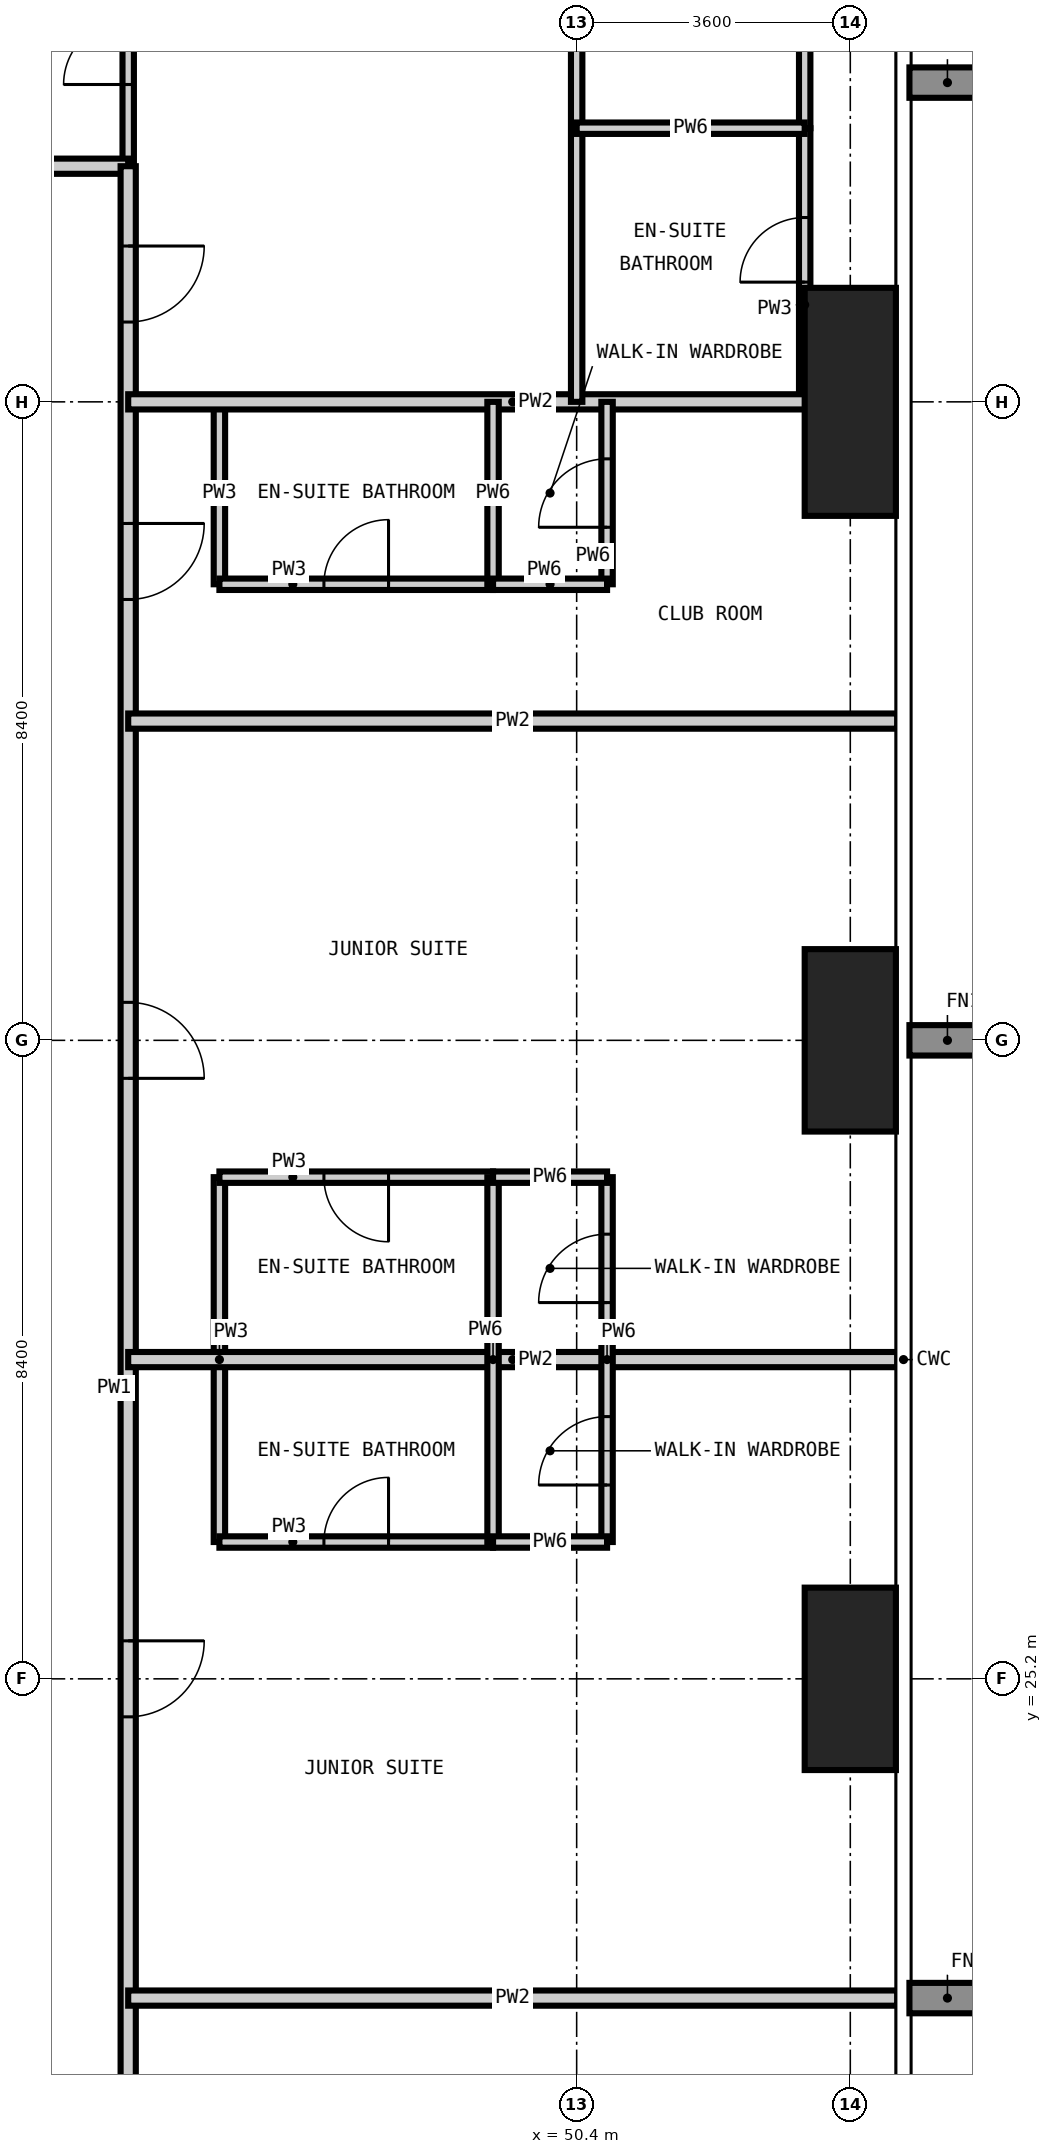
"""IFC4 building model, lengths in metres.
Left out: names, types, materials, properties, quantities, classifications, styles, units other than length and angle.
Written with IfcOpenShell. Run it as: python <this file> out.ifc"""

import sys

from ifc_helpers import new_model, si_unit, direction, frame, frame_2d, origin, origin_2d, place, context, subcontext, project, spatial, rectangle, extrude, element, fill, save


model = new_model("IFC4")
c1 = context("Model", 3, precision=1e-05, world=origin(), true_north=direction((0.0, 1.0)))
c2 = subcontext(c1, "Body", "Model", "MODEL_VIEW")
j1 = project(units=[si_unit("LENGTHUNIT", "METRE"), si_unit("PLANEANGLEUNIT", "RADIAN")], contexts=[c1])
p1 = place(None, origin())
s1 = spatial("IfcSite", under=j1, at=p1, CompositionType="ELEMENT")
p2 = place(p1, origin())
s2 = spatial("IfcBuilding", under=s1, at=p2, CompositionType="ELEMENT")
p3 = place(p2, frame((0.0, 0.0, 216.6)))
s3 = spatial("IfcBuildingStorey", under=s2, at=p3, CompositionType="ELEMENT", Elevation=216.6)
for number, where, z_axis, x_axis in (
    (1, (54.0, 25.2, -0.35), (0.0, 0.0, 1.0), (1.0, 0.0, 0.0)),
    (2, (54.0, 33.6, -0.35), (0.0, 0.0, 1.0), (1.0, 0.0, 0.0)),
):
    element("IfcColumn", number, at=place(p3, frame(where, z_axis=z_axis, x_axis=x_axis)), inside=s3, PredefinedType="COLUMN", context=c2, shape_type="SweptSolid", body=[
        extrude(rectangle(XDim=1.2, YDim=2.4, at=origin_2d()), origin(), (0.0, 0.0, 1.0), 3.55),
    ])
p4 = place(p3, frame((54.0, 42.0, -0.35), z_axis=(0.0, 0.0, 1.0), x_axis=(1.0, 0.0, 0.0)))
e3 = element("IfcColumn", 3, at=p4, inside=s3, PredefinedType="COLUMN", context=c2, shape_type="SweptSolid", body=[
    extrude(rectangle(XDim=1.2, YDim=3.0, at=origin_2d()), origin(), (0.0, 0.0, 1.0), 3.55),
])
p5 = place(p3, frame((44.5, 45.1, 0.0), z_axis=(0.0, 0.0, 1.0), x_axis=(0.0, 1.0, 0.0)))
e4 = element("IfcWall", 4, at=p5, inside=s3, PredefinedType="PARTITIONING", context=c2, shape_type="SweptSolid", body=[
    extrude(rectangle(XDim=3.0, YDim=0.15, at=frame_2d((1.5, 0.0))), origin(), (0.0, 0.0, 1.0), 3.2),
])
p6 = place(p5, frame((1.075, 0.0, 0.0)))
e5 = element("IfcOpeningElement", 5, at=p6, cuts=e4, PredefinedType="OPENING", context=c2, shape_type="SweptSolid", body=[
    extrude(rectangle(XDim=0.85, YDim=2.1, at=frame_2d((0.425, 1.05))), frame((0.0, 0.085, 0.0), z_axis=(0.0, -1.0, 0.0), x_axis=(1.0, 0.0, 0.0)), (0.0, 0.0, 1.0), 0.17),
])
p7 = place(p3, frame((45.7, 27.0, 0.0), z_axis=(0.0, 0.0, 1.0), x_axis=(0.0, 1.0, 0.0)))
e6 = element("IfcWall", 6, at=p7, inside=s3, PredefinedType="PARTITIONING", context=c2, shape_type="SweptSolid", body=[
    extrude(rectangle(XDim=4.8, YDim=0.15, at=frame_2d((2.4, 0.0))), origin(), (0.0, 0.0, 1.0), 3.2),
])
p8 = place(p3, frame((45.7, 39.6, 0.0), z_axis=(0.0, 0.0, 1.0), x_axis=(0.0, 1.0, 0.0)))
e7 = element("IfcWall", 7, at=p8, inside=s3, PredefinedType="PARTITIONING", context=c2, shape_type="SweptSolid", body=[
    extrude(rectangle(XDim=2.4, YDim=0.15, at=frame_2d((1.2, 0.0))), origin(), (0.0, 0.0, 1.0), 3.2),
])
p9 = place(p3, frame((53.4, 42.0, 0.0), z_axis=(0.0, 0.0, 1.0), x_axis=(0.0, 1.0, 0.0)))
e8 = element("IfcWall", 8, at=p9, inside=s3, PredefinedType="PARTITIONING", context=c2, shape_type="SweptSolid", body=[
    extrude(rectangle(XDim=3.6, YDim=0.15, at=frame_2d((1.8, 0.0))), origin(), (0.0, 0.0, 1.0), 3.2),
])
p10 = place(p9, frame((1.575, 0.0, 0.0)))
e9 = element("IfcOpeningElement", 9, at=p10, cuts=e8, PredefinedType="OPENING", context=c2, shape_type="SweptSolid", body=[
    extrude(rectangle(XDim=0.85, YDim=2.1, at=frame_2d((0.425, 1.05))), frame((0.0, 0.085, 0.0), z_axis=(0.0, -1.0, 0.0), x_axis=(1.0, 0.0, 0.0)), (0.0, 0.0, 1.0), 0.17),
])
p11 = place(p3, frame((45.7, 27.0, 0.0), z_axis=(0.0, 0.0, 1.0), x_axis=(1.0, 0.0, 0.0)))
e10 = element("IfcWall", 10, at=p11, inside=s3, PredefinedType="PARTITIONING", context=c2, shape_type="SweptSolid", body=[
    extrude(rectangle(XDim=3.6, YDim=0.15, at=frame_2d((1.8, 0.0))), origin(), (0.0, 0.0, 1.0), 3.2),
])
p12 = place(p11, frame((1.375, 0.0, 0.0)))
e11 = element("IfcOpeningElement", 11, at=p12, cuts=e10, PredefinedType="OPENING", context=c2, shape_type="SweptSolid", body=[
    extrude(rectangle(XDim=0.85, YDim=2.1, at=frame_2d((0.425, 1.05))), frame((0.0, 0.085, 0.0), z_axis=(0.0, -1.0, 0.0), x_axis=(1.0, 0.0, 0.0)), (0.0, 0.0, 1.0), 0.17),
])
p13 = place(p3, frame((45.7, 31.8, 0.0), z_axis=(0.0, 0.0, 1.0), x_axis=(1.0, 0.0, 0.0)))
e12 = element("IfcWall", 12, at=p13, inside=s3, PredefinedType="PARTITIONING", context=c2, shape_type="SweptSolid", body=[
    extrude(rectangle(XDim=3.6, YDim=0.15, at=frame_2d((1.8, 0.0))), origin(), (0.0, 0.0, 1.0), 3.2),
])
p14 = place(p13, frame((1.375, 0.0, 0.0)))
e13 = element("IfcOpeningElement", 13, at=p14, cuts=e12, PredefinedType="OPENING", context=c2, shape_type="SweptSolid", body=[
    extrude(rectangle(XDim=0.85, YDim=2.1, at=frame_2d((0.425, 1.05))), frame((0.0, 0.085, 0.0), z_axis=(0.0, -1.0, 0.0), x_axis=(1.0, 0.0, 0.0)), (0.0, 0.0, 1.0), 0.17),
])
p15 = place(p3, frame((45.7, 39.6, 0.0), z_axis=(0.0, 0.0, 1.0), x_axis=(1.0, 0.0, 0.0)))
e14 = element("IfcWall", 14, at=p15, inside=s3, PredefinedType="PARTITIONING", context=c2, shape_type="SweptSolid", body=[
    extrude(rectangle(XDim=3.6, YDim=0.15, at=frame_2d((1.8, 0.0))), origin(), (0.0, 0.0, 1.0), 3.2),
])
p16 = place(p15, frame((1.375, 0.0, 0.0)))
e15 = element("IfcOpeningElement", 15, at=p16, cuts=e14, PredefinedType="OPENING", context=c2, shape_type="SweptSolid", body=[
    extrude(rectangle(XDim=0.85, YDim=2.1, at=frame_2d((0.425, 1.05))), frame((0.0, 0.085, 0.0), z_axis=(0.0, -1.0, 0.0), x_axis=(1.0, 0.0, 0.0)), (0.0, 0.0, 1.0), 0.17),
])
p17 = place(p3, frame((42.0, 45.1, 0.0), z_axis=(0.0, 0.0, 1.0), x_axis=(1.0, 0.0, 0.0)))
e16 = element("IfcWall", 16, at=p17, inside=s3, PredefinedType="PARTITIONING", context=c2, shape_type="SweptSolid", body=[
    extrude(rectangle(XDim=2.5, YDim=0.2, at=frame_2d((1.25, 0.0))), origin(), (0.0, 0.0, 1.0), 3.2),
])
p18 = place(p3, frame((44.5, 45.1, 0.0), z_axis=(0.0, 0.0, 1.0), x_axis=(0.0, -1.0, 0.0)))
e17 = element("IfcWall", 17, at=p18, inside=s3, PredefinedType="PARTITIONING", context=c2, shape_type="SweptSolid", body=[
    extrude(rectangle(XDim=32.0, YDim=0.2, at=frame_2d((16.0, 0.0))), origin(), (0.0, 0.0, 1.0), 3.2),
])
p19 = place(p18, frame((25.7, 0.0, 0.0)))
e18 = element("IfcOpeningElement", 18, at=p19, cuts=e17, PredefinedType="OPENING", context=c2, shape_type="SweptSolid", body=[
    extrude(rectangle(XDim=1.0, YDim=2.2, at=frame_2d((0.5, 1.1))), frame((0.0, 0.11, 0.0), z_axis=(0.0, -1.0, 0.0), x_axis=(1.0, 0.0, 0.0)), (0.0, 0.0, 1.0), 0.22),
])
p20 = place(p18, frame((19.4, 0.0, 0.0)))
e19 = element("IfcOpeningElement", 19, at=p20, cuts=e17, PredefinedType="OPENING", context=c2, shape_type="SweptSolid", body=[
    extrude(rectangle(XDim=1.0, YDim=2.2, at=frame_2d((0.5, 1.1))), frame((0.0, 0.11, 0.0), z_axis=(0.0, -1.0, 0.0), x_axis=(1.0, 0.0, 0.0)), (0.0, 0.0, 1.0), 0.22),
])
p21 = place(p18, frame((11.0, 0.0, 0.0)))
e20 = element("IfcOpeningElement", 20, at=p21, cuts=e17, PredefinedType="OPENING", context=c2, shape_type="SweptSolid", body=[
    extrude(rectangle(XDim=1.0, YDim=2.2, at=frame_2d((0.5, 1.1))), frame((0.0, 0.11, 0.0), z_axis=(0.0, -1.0, 0.0), x_axis=(1.0, 0.0, 0.0)), (0.0, 0.0, 1.0), 0.22),
])
p22 = place(p18, frame((4.7, 0.0, 0.0)))
e21 = element("IfcOpeningElement", 21, at=p22, cuts=e17, PredefinedType="OPENING", context=c2, shape_type="SweptSolid", body=[
    extrude(rectangle(XDim=1.0, YDim=2.2, at=frame_2d((0.5, 1.1))), frame((0.0, 0.11, 0.0), z_axis=(0.0, -1.0, 0.0), x_axis=(1.0, 0.0, 0.0)), (0.0, 0.0, 1.0), 0.22),
])
p23 = place(p18, frame((29.65, 0.0, 0.0)))
e22 = element("IfcOpeningElement", 22, at=p23, cuts=e17, PredefinedType="OPENING", context=c2, shape_type="SweptSolid", body=[
    extrude(rectangle(XDim=1.0, YDim=2.2, at=frame_2d((0.5, 1.1))), frame((0.0, 0.11, 0.0), z_axis=(0.0, -1.0, 0.0), x_axis=(1.0, 0.0, 0.0)), (0.0, 0.0, 1.0), 0.22),
])
p24 = place(p18, frame((1.05, 0.0, 0.0)))
e23 = element("IfcOpeningElement", 23, at=p24, cuts=e17, PredefinedType="OPENING", context=c2, shape_type="SweptSolid", body=[
    extrude(rectangle(XDim=1.0, YDim=2.2, at=frame_2d((0.5, 1.1))), frame((0.0, 0.11, 0.0), z_axis=(0.0, -1.0, 0.0), x_axis=(1.0, 0.0, 0.0)), (0.0, 0.0, 1.0), 0.22),
])
for number, where, z_axis, x_axis in (
    (24, (44.5, 21.0, 0.0), (0.0, 0.0, 1.0), (1.0, 0.0, 0.0)),
    (25, (44.5, 29.4, 0.0), (0.0, 0.0, 1.0), (1.0, 0.0, 0.0)),
    (26, (44.5, 37.8, 0.0), (0.0, 0.0, 1.0), (1.0, 0.0, 0.0)),
    (27, (44.5, 42.0, 0.0), (0.0, 0.0, 1.0), (1.0, 0.0, 0.0)),
):
    element("IfcWall", number, at=place(p3, frame(where, z_axis=z_axis, x_axis=x_axis)), inside=s3, PredefinedType="PARTITIONING", context=c2, shape_type="SweptSolid", body=[
        extrude(rectangle(XDim=10.118, YDim=0.2, at=frame_2d((5.059, 0.0))), origin(), (0.0, 0.0, 1.0), 3.2),
    ])
p25 = place(p3, frame((49.3, 27.0, 0.0), z_axis=(0.0, 0.0, 1.0), x_axis=(0.0, 1.0, 0.0)))
e28 = element("IfcWall", 28, at=p25, inside=s3, PredefinedType="PARTITIONING", context=c2, shape_type="SweptSolid", body=[
    extrude(rectangle(XDim=4.8, YDim=0.15, at=frame_2d((2.4, 0.0))), origin(), (0.0, 0.0, 1.0), 3.2),
])
p26 = place(p3, frame((49.3, 39.6, 0.0), z_axis=(0.0, 0.0, 1.0), x_axis=(0.0, 1.0, 0.0)))
e29 = element("IfcWall", 29, at=p26, inside=s3, PredefinedType="PARTITIONING", context=c2, shape_type="SweptSolid", body=[
    extrude(rectangle(XDim=2.4, YDim=0.15, at=frame_2d((1.2, 0.0))), origin(), (0.0, 0.0, 1.0), 3.2),
])
p27 = place(p3, frame((50.4, 42.0, 0.0), z_axis=(0.0, 0.0, 1.0), x_axis=(0.0, 1.0, 0.0)))
e30 = element("IfcWall", 30, at=p27, inside=s3, PredefinedType="PARTITIONING", context=c2, shape_type="SweptSolid", body=[
    extrude(rectangle(XDim=12.618, YDim=0.15, at=frame_2d((6.309, 0.0))), origin(), (0.0, 0.0, 1.0), 3.2),
])
p28 = place(p27, frame((8.85, 0.0, 0.0)))
e31 = element("IfcOpeningElement", 31, at=p28, cuts=e30, PredefinedType="OPENING", context=c2, shape_type="SweptSolid", body=[
    extrude(rectangle(XDim=0.9, YDim=2.1, at=frame_2d((0.45, 1.05))), frame((0.0, 0.085, 0.0), z_axis=(0.0, -1.0, 0.0), x_axis=(1.0, 0.0, 0.0)), (0.0, 0.0, 1.0), 0.17),
])
p29 = place(p3, frame((50.8, 27.0, 0.0), z_axis=(0.0, 0.0, 1.0), x_axis=(0.0, 1.0, 0.0)))
e32 = element("IfcWall", 32, at=p29, inside=s3, PredefinedType="PARTITIONING", context=c2, shape_type="SweptSolid", body=[
    extrude(rectangle(XDim=4.8, YDim=0.15, at=frame_2d((2.4, 0.0))), origin(), (0.0, 0.0, 1.0), 3.2),
])
p30 = place(p29, frame((0.75, 0.0, 0.0)))
e33 = element("IfcOpeningElement", 33, at=p30, cuts=e32, PredefinedType="OPENING", context=c2, shape_type="SweptSolid", body=[
    extrude(rectangle(XDim=0.9, YDim=2.1, at=frame_2d((0.45, 1.05))), frame((0.0, 0.085, 0.0), z_axis=(0.0, -1.0, 0.0), x_axis=(1.0, 0.0, 0.0)), (0.0, 0.0, 1.0), 0.17),
])
p31 = place(p29, frame((3.15, 0.0, 0.0)))
e34 = element("IfcOpeningElement", 34, at=p31, cuts=e32, PredefinedType="OPENING", context=c2, shape_type="SweptSolid", body=[
    extrude(rectangle(XDim=0.9, YDim=2.1, at=frame_2d((0.45, 1.05))), frame((0.0, 0.085, 0.0), z_axis=(0.0, -1.0, 0.0), x_axis=(1.0, 0.0, 0.0)), (0.0, 0.0, 1.0), 0.17),
])
p32 = place(p3, frame((50.8, 39.6, 0.0), z_axis=(0.0, 0.0, 1.0), x_axis=(0.0, 1.0, 0.0)))
e35 = element("IfcWall", 35, at=p32, inside=s3, PredefinedType="PARTITIONING", context=c2, shape_type="SweptSolid", body=[
    extrude(rectangle(XDim=2.4, YDim=0.15, at=frame_2d((1.2, 0.0))), origin(), (0.0, 0.0, 1.0), 3.2),
])
p33 = place(p32, frame((0.75, 0.0, 0.0)))
e36 = element("IfcOpeningElement", 36, at=p33, cuts=e35, PredefinedType="OPENING", context=c2, shape_type="SweptSolid", body=[
    extrude(rectangle(XDim=0.9, YDim=2.1, at=frame_2d((0.45, 1.05))), frame((0.0, 0.085, 0.0), z_axis=(0.0, -1.0, 0.0), x_axis=(1.0, 0.0, 0.0)), (0.0, 0.0, 1.0), 0.17),
])
p34 = place(p3, frame((53.4, 45.6, 0.0), z_axis=(0.0, 0.0, 1.0), x_axis=(0.0, 1.0, 0.0)))
e37 = element("IfcWall", 37, at=p34, inside=s3, PredefinedType="PARTITIONING", context=c2, shape_type="SweptSolid", body=[
    extrude(rectangle(XDim=2.4, YDim=0.15, at=frame_2d((1.2, 0.0))), origin(), (0.0, 0.0, 1.0), 3.2),
])
for number, where, z_axis, x_axis in (
    (38, (49.3, 27.0, 0.0), (0.0, 0.0, 1.0), (1.0, 0.0, 0.0)),
    (39, (49.3, 31.8, 0.0), (0.0, 0.0, 1.0), (1.0, 0.0, 0.0)),
    (40, (49.3, 39.6, 0.0), (0.0, 0.0, 1.0), (1.0, 0.0, 0.0)),
):
    element("IfcWall", number, at=place(p3, frame(where, z_axis=z_axis, x_axis=x_axis)), inside=s3, PredefinedType="PARTITIONING", context=c2, shape_type="SweptSolid", body=[
        extrude(rectangle(XDim=1.5, YDim=0.15, at=frame_2d((0.75, 0.0))), origin(), (0.0, 0.0, 1.0), 3.2),
    ])
p35 = place(p3, frame((50.4, 45.6, 0.0), z_axis=(0.0, 0.0, 1.0), x_axis=(1.0, 0.0, 0.0)))
e41 = element("IfcWall", 41, at=p35, inside=s3, PredefinedType="PARTITIONING", context=c2, shape_type="SweptSolid", body=[
    extrude(rectangle(XDim=3.0, YDim=0.15, at=frame_2d((1.5, 0.0))), origin(), (0.0, 0.0, 1.0), 3.2),
])
p36 = place(p20, origin())
e42 = element("IfcDoor", 42, at=p36, inside=s3, OperationType="SINGLE_SWING_LEFT", PredefinedType="DOOR", context=c2, shape_type="SweptSolid", body=[
    extrude(rectangle(XDim=1.0, YDim=2.2, at=frame_2d((0.5, 1.1))), frame((0.0, 0.025, 0.0), z_axis=(0.0, -1.0, 0.0), x_axis=(1.0, 0.0, 0.0)), (0.0, 0.0, 1.0), 0.05),
])
fill(e19, e42)
p37 = place(p12, origin())
e43 = element("IfcDoor", 43, at=p37, inside=s3, OperationType="SINGLE_SWING_RIGHT", PredefinedType="DOOR", context=c2, shape_type="SweptSolid", body=[
    extrude(rectangle(XDim=0.85, YDim=2.1, at=frame_2d((0.425, 1.05))), frame((0.0, 0.025, 0.0), z_axis=(0.0, -1.0, 0.0), x_axis=(1.0, 0.0, 0.0)), (0.0, 0.0, 1.0), 0.05),
])
fill(e11, e43)
p38 = place(p30, origin())
e44 = element("IfcDoor", 44, at=p38, inside=s3, OperationType="SINGLE_SWING_LEFT", PredefinedType="DOOR", context=c2, shape_type="SweptSolid", body=[
    extrude(rectangle(XDim=0.9, YDim=2.1, at=frame_2d((0.45, 1.05))), frame((0.0, 0.025, 0.0), z_axis=(0.0, -1.0, 0.0), x_axis=(1.0, 0.0, 0.0)), (0.0, 0.0, 1.0), 0.05),
])
fill(e33, e44)
p39 = place(p21, origin())
e45 = element("IfcDoor", 45, at=p39, inside=s3, OperationType="SINGLE_SWING_RIGHT", PredefinedType="DOOR", context=c2, shape_type="SweptSolid", body=[
    extrude(rectangle(XDim=1.0, YDim=2.2, at=frame_2d((0.5, 1.1))), frame((0.0, 0.025, 0.0), z_axis=(0.0, -1.0, 0.0), x_axis=(1.0, 0.0, 0.0)), (0.0, 0.0, 1.0), 0.05),
])
fill(e20, e45)
p40 = place(p14, frame((0.85, 0.0, 0.0), z_axis=(0.0, 0.0, 1.0), x_axis=(-1.0, 0.0, 0.0)))
e46 = element("IfcDoor", 46, at=p40, inside=s3, OperationType="SINGLE_SWING_LEFT", PredefinedType="DOOR", context=c2, shape_type="SweptSolid", body=[
    extrude(rectangle(XDim=0.85, YDim=2.1, at=frame_2d((0.425, 1.05))), frame((0.0, 0.025, 0.0), z_axis=(0.0, -1.0, 0.0), x_axis=(1.0, 0.0, 0.0)), (0.0, 0.0, 1.0), 0.05),
])
fill(e13, e46)
p41 = place(p31, origin())
e47 = element("IfcDoor", 47, at=p41, inside=s3, OperationType="SINGLE_SWING_LEFT", PredefinedType="DOOR", context=c2, shape_type="SweptSolid", body=[
    extrude(rectangle(XDim=0.9, YDim=2.1, at=frame_2d((0.45, 1.05))), frame((0.0, 0.025, 0.0), z_axis=(0.0, -1.0, 0.0), x_axis=(1.0, 0.0, 0.0)), (0.0, 0.0, 1.0), 0.05),
])
fill(e34, e47)
p42 = place(p22, origin())
e48 = element("IfcDoor", 48, at=p42, inside=s3, OperationType="SINGLE_SWING_LEFT", PredefinedType="DOOR", context=c2, shape_type="SweptSolid", body=[
    extrude(rectangle(XDim=1.0, YDim=2.2, at=frame_2d((0.5, 1.1))), frame((0.0, 0.025, 0.0), z_axis=(0.0, -1.0, 0.0), x_axis=(1.0, 0.0, 0.0)), (0.0, 0.0, 1.0), 0.05),
])
fill(e21, e48)
p43 = place(p16, origin())
e49 = element("IfcDoor", 49, at=p43, inside=s3, OperationType="SINGLE_SWING_RIGHT", PredefinedType="DOOR", context=c2, shape_type="SweptSolid", body=[
    extrude(rectangle(XDim=0.85, YDim=2.1, at=frame_2d((0.425, 1.05))), frame((0.0, 0.025, 0.0), z_axis=(0.0, -1.0, 0.0), x_axis=(1.0, 0.0, 0.0)), (0.0, 0.0, 1.0), 0.05),
])
fill(e15, e49)
p44 = place(p33, origin())
e50 = element("IfcDoor", 50, at=p44, inside=s3, OperationType="SINGLE_SWING_LEFT", PredefinedType="DOOR", context=c2, shape_type="SweptSolid", body=[
    extrude(rectangle(XDim=0.9, YDim=2.1, at=frame_2d((0.45, 1.05))), frame((0.0, 0.025, 0.0), z_axis=(0.0, -1.0, 0.0), x_axis=(1.0, 0.0, 0.0)), (0.0, 0.0, 1.0), 0.05),
])
fill(e36, e50)
p45 = place(p24, origin())
e51 = element("IfcDoor", 51, at=p45, inside=s3, OperationType="SINGLE_SWING_LEFT", PredefinedType="DOOR", context=c2, shape_type="SweptSolid", body=[
    extrude(rectangle(XDim=1.0, YDim=2.2, at=frame_2d((0.5, 1.1))), frame((0.0, 0.025, 0.0), z_axis=(0.0, -1.0, 0.0), x_axis=(1.0, 0.0, 0.0)), (0.0, 0.0, 1.0), 0.05),
])
fill(e23, e51)
p46 = place(p6, origin())
e52 = element("IfcDoor", 52, at=p46, inside=s3, OperationType="SINGLE_SWING_LEFT", PredefinedType="DOOR", context=c2, shape_type="SweptSolid", body=[
    extrude(rectangle(XDim=0.85, YDim=2.1, at=frame_2d((0.425, 1.05))), frame((0.0, 0.025, 0.0), z_axis=(0.0, -1.0, 0.0), x_axis=(1.0, 0.0, 0.0)), (0.0, 0.0, 1.0), 0.05),
])
fill(e5, e52)
p47 = place(p10, origin())
e53 = element("IfcDoor", 53, at=p47, inside=s3, OperationType="SINGLE_SWING_LEFT", PredefinedType="DOOR", context=c2, shape_type="SweptSolid", body=[
    extrude(rectangle(XDim=0.85, YDim=2.1, at=frame_2d((0.425, 1.05))), frame((0.0, 0.025, 0.0), z_axis=(0.0, -1.0, 0.0), x_axis=(1.0, 0.0, 0.0)), (0.0, 0.0, 1.0), 0.05),
])
fill(e9, e53)
save(model, sys.argv[1])
